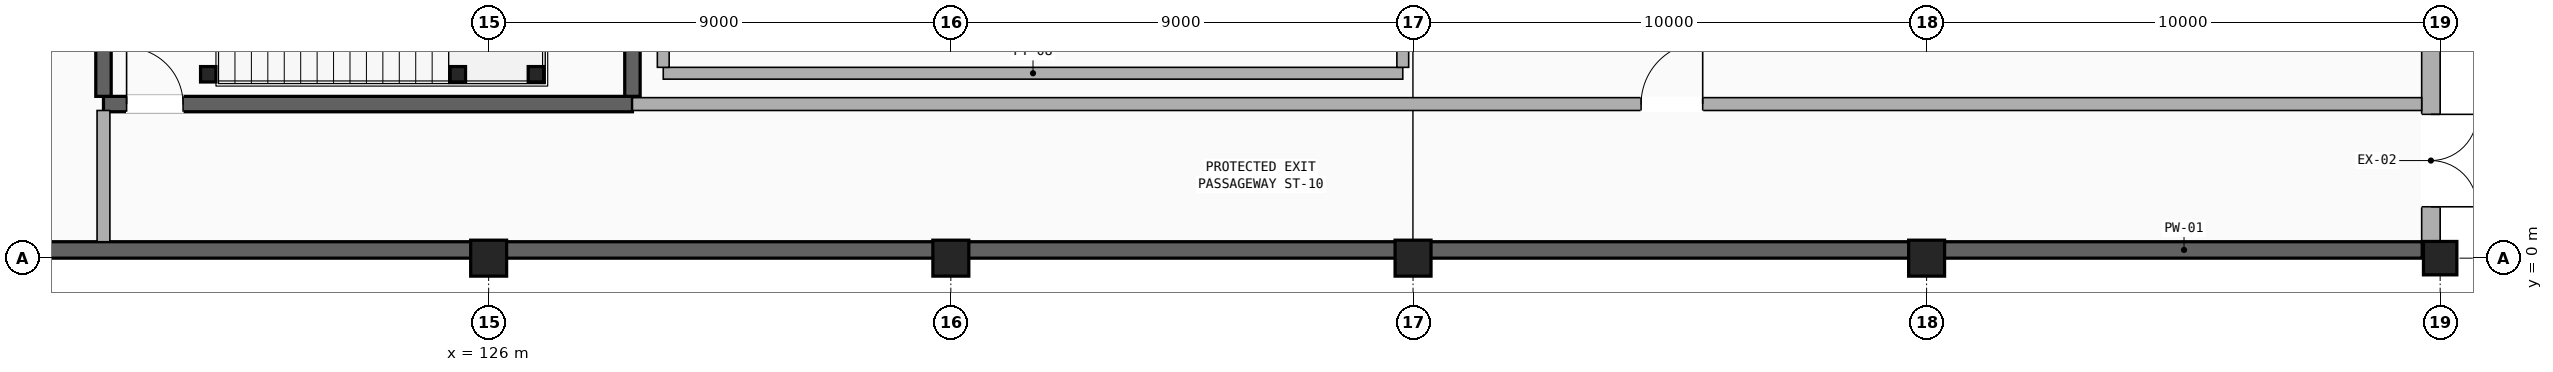
"""IFC4 building model, lengths in metres.
Left out: names, types, materials, properties, quantities, classifications, styles, units other than length and angle.
Written with IfcOpenShell. Run it as: python <this file> out.ifc"""

import sys

from ifc_helpers import new_model, si_unit, direction, frame, frame_2d, origin, origin_2d, place, context, subcontext, project, spatial, rectangle, hollow_rectangle, extrude, element, fill, save


model = new_model("IFC4")
c1 = context("Model", 3, precision=1e-05, world=origin(), true_north=direction((0.0, 1.0)))
c2 = subcontext(c1, "Body", "Model", "MODEL_VIEW")
j1 = project(units=[si_unit("LENGTHUNIT", "METRE"), si_unit("PLANEANGLEUNIT", "RADIAN")], contexts=[c1])
p1 = place(None, origin())
s1 = spatial("IfcSite", under=j1, at=p1, CompositionType="ELEMENT")
p2 = place(p1, origin())
s2 = spatial("IfcBuilding", under=s1, at=p2, CompositionType="ELEMENT")
p3 = place(p2, origin())
s3 = spatial("IfcBuildingStorey", under=s2, at=p3, CompositionType="ELEMENT", Elevation=0.0)
for number, where, z_axis, x_axis in (
    (1, (126.0, 0.0, 0.0), (0.0, 0.0, 1.0), (1.0, 0.0, 0.0)),
    (2, (135.0, 0.0, 0.0), (0.0, 0.0, 1.0), (1.0, 0.0, 0.0)),
    (3, (144.0, 0.0, 0.0), (0.0, 0.0, 1.0), (1.0, 0.0, 0.0)),
    (4, (154.0, 0.0, 0.0), (0.0, 0.0, 1.0), (1.0, 0.0, 0.0)),
):
    element("IfcColumn", number, at=place(p3, frame(where, z_axis=z_axis, x_axis=x_axis)), inside=s3, PredefinedType="COLUMN", context=c2, shape_type="SweptSolid", body=[
        extrude(rectangle(XDim=0.7, YDim=0.7, at=origin_2d()), origin(), (0.0, 0.0, 1.0), 5.1),
    ])
p4 = place(p3, frame((164.0, 0.0, 0.0), z_axis=(0.0, 0.0, 1.0), x_axis=(1.0, 0.0, 0.0)))
e5 = element("IfcColumn", 5, at=p4, inside=s3, PredefinedType="COLUMN", context=c2, shape_type="SweptSolid", body=[
    extrude(rectangle(XDim=0.65, YDim=0.65, at=origin_2d()), origin(), (0.0, 0.0, 1.0), 5.1),
])
p5 = place(p3, frame((118.5, 3.0, 0.0), z_axis=(0.0, 0.0, 1.0), x_axis=(1.0, 0.0, 0.0)))
e6 = element("IfcWall", 6, at=p5, inside=s3, PredefinedType="SHEAR", context=c2, shape_type="SweptSolid", body=[
    extrude(rectangle(XDim=10.3, YDim=0.3, at=frame_2d((5.15, 0.0))), origin(), (0.0, 0.0, 1.0), 5.1),
])
p6 = place(p5, frame((0.45, 0.0, 0.0)))
e7 = element("IfcOpeningElement", 7, at=p6, cuts=e6, PredefinedType="OPENING", context=c2, shape_type="SweptSolid", body=[
    extrude(rectangle(XDim=1.1, YDim=2.2, at=frame_2d((0.55, 1.1))), frame((0.0, 0.16, 0.0), z_axis=(0.0, -1.0, 0.0), x_axis=(1.0, 0.0, 0.0)), (0.0, 0.0, 1.0), 0.32),
])
for number, where, z_axis, x_axis in (
    (8, (118.5, 3.15, 0.0), (0.0, 0.0, 1.0), (0.0, 1.0, 0.0)),
    (9, (128.8, 3.15, 0.0), (0.0, 0.0, 1.0), (0.0, 1.0, 0.0)),
):
    element("IfcWall", number, at=place(p3, frame(where, z_axis=z_axis, x_axis=x_axis)), inside=s3, PredefinedType="SHEAR", context=c2, shape_type="SweptSolid", body=[
        extrude(rectangle(XDim=5.1, YDim=0.3, at=frame_2d((2.55, 0.0))), origin(), (0.0, 0.0, 1.0), 5.1),
    ])
p7 = place(p3, frame((73.775, 0.16, 0.0), z_axis=(0.0, 0.0, 1.0), x_axis=(1.0, 0.0, 0.0)))
e10 = element("IfcWall", 10, at=p7, inside=s3, PredefinedType="SHEAR", context=c2, shape_type="SweptSolid", body=[
    extrude(rectangle(XDim=89.875, YDim=0.32, at=frame_2d((44.938, 0.0))), origin(), (0.0, 0.0, 1.0), 5.1),
])
p8 = place(p3, frame((163.82, 0.325, 0.0), z_axis=(0.0, 0.0, 1.0), x_axis=(0.0, 1.0, 0.0)))
e11 = element("IfcWall", 11, at=p8, inside=s3, PredefinedType="STANDARD", context=c2, shape_type="SweptSolid", body=[
    extrude(rectangle(XDim=8.35, YDim=0.36, at=frame_2d((4.175, 0.0))), origin(), (0.0, 0.0, 1.0), 4.08),
])
p9 = place(p8, frame((0.675, 0.0, 0.0)))
e12 = element("IfcOpeningElement", 12, at=p9, cuts=e11, PredefinedType="OPENING", context=c2, shape_type="SweptSolid", body=[
    extrude(rectangle(XDim=1.8, YDim=2.3, at=frame_2d((0.9, 1.15))), frame((0.0, 0.19, 0.0), z_axis=(0.0, -1.0, 0.0), x_axis=(1.0, 0.0, 0.0)), (0.0, 0.0, 1.0), 0.38),
])
p10 = place(p8, frame((5.025, 0.0, 0.9)))
e13 = element("IfcOpeningElement", 13, at=p10, cuts=e11, PredefinedType="OPENING", context=c2, shape_type="SweptSolid", body=[
    extrude(rectangle(XDim=1.4, YDim=2.4, at=frame_2d((0.7, 1.2))), frame((0.0, 0.19, 0.0), z_axis=(0.0, -1.0, 0.0), x_axis=(1.0, 0.0, 0.0)), (0.0, 0.0, 1.0), 0.38),
])
for number, where, z_axis, x_axis in (
    (14, (120.54, 3.58, 0.0), (0.0, 0.0, 1.0), (1.0, 0.0, 0.0)),
    (15, (125.4, 3.58, 0.0), (0.0, 0.0, 1.0), (1.0, 0.0, 0.0)),
    (16, (126.92, 3.58, 0.0), (0.0, 0.0, 1.0), (1.0, 0.0, 0.0)),
):
    element("IfcColumn", number, at=place(p3, frame(where, z_axis=z_axis, x_axis=x_axis)), inside=s3, PredefinedType="COLUMN", context=c2, shape_type="SweptSolid", body=[
        extrude(hollow_rectangle(XDim=0.3, YDim=0.3, WallThickness=0.016, InnerFilletRadius=0.016, OuterFilletRadius=0.032, at=origin_2d()), origin(), (0.0, 0.0, 1.0), 5.1),
    ])
p11 = place(p3, frame((129.4, 3.6, 0.0), z_axis=(0.0, 0.0, 1.0), x_axis=(1.0, 0.0, 0.0)))
e17 = element("IfcWall", 17, at=p11, inside=s3, PredefinedType="PARTITIONING", context=c2, shape_type="SweptSolid", body=[
    extrude(rectangle(XDim=14.4, YDim=0.23, at=frame_2d((7.2, 0.0))), origin(), (0.0, 0.0, 1.0), 4.15),
])
p12 = place(p3, frame((129.4, 3.715, 0.0), z_axis=(0.0, 0.0, 1.0), x_axis=(0.0, 1.0, 0.0)))
e18 = element("IfcWall", 18, at=p12, inside=s3, PredefinedType="PARTITIONING", context=c2, shape_type="SweptSolid", body=[
    extrude(rectangle(XDim=2.97, YDim=0.23, at=frame_2d((1.485, 0.0))), origin(), (0.0, 0.0, 1.0), 4.85),
])
p13 = place(p3, frame((143.8, 3.715, 0.0), z_axis=(0.0, 0.0, 1.0), x_axis=(0.0, 1.0, 0.0)))
e19 = element("IfcWall", 19, at=p13, inside=s3, PredefinedType="PARTITIONING", context=c2, shape_type="SweptSolid", body=[
    extrude(rectangle(XDim=2.97, YDim=0.23, at=frame_2d((1.485, 0.0))), origin(), (0.0, 0.0, 1.0), 4.15),
])
p14 = place(p3, frame((163.64, 3.0, 0.0), z_axis=(0.0, 0.0, 1.0), x_axis=(-1.0, 0.0, 0.0)))
e20 = element("IfcWall", 20, at=p14, inside=s3, PredefinedType="PARTITIONING", context=c2, shape_type="SweptSolid", body=[
    extrude(rectangle(XDim=34.84, YDim=0.25, at=frame_2d((17.42, 0.0))), origin(), (0.0, 0.0, 1.0), 4.15),
])
p15 = place(p14, frame((14.0, 0.0, 0.0)))
e21 = element("IfcOpeningElement", 21, at=p15, cuts=e20, PredefinedType="OPENING", context=c2, shape_type="SweptSolid", body=[
    extrude(rectangle(XDim=1.2, YDim=2.2, at=frame_2d((0.6, 1.1))), frame((0.0, 0.135, 0.0), z_axis=(0.0, -1.0, 0.0), x_axis=(1.0, 0.0, 0.0)), (0.0, 0.0, 1.0), 0.27),
])
p16 = place(p3, frame((118.5, 2.875, 0.0), z_axis=(0.0, 0.0, 1.0), x_axis=(0.0, -1.0, 0.0)))
e22 = element("IfcWall", 22, at=p16, inside=s3, PredefinedType="PARTITIONING", context=c2, shape_type="SweptSolid", body=[
    extrude(rectangle(XDim=2.555, YDim=0.25, at=frame_2d((1.277, 0.0))), origin(), (0.0, 0.0, 1.0), 4.08),
])
p17 = place(p9, frame((1.8, 0.0, 0.0), z_axis=(0.0, 0.0, 1.0), x_axis=(-1.0, 0.0, 0.0)))
e23 = element("IfcDoor", 23, at=p17, inside=s3, OperationType="DOUBLE_DOOR_SINGLE_SWING", PredefinedType="DOOR", context=c2, shape_type="SweptSolid", body=[
    extrude(rectangle(XDim=1.8, YDim=2.3, at=frame_2d((0.9, 1.15))), frame((0.0, 0.025, 0.0), z_axis=(0.0, -1.0, 0.0), x_axis=(1.0, 0.0, 0.0)), (0.0, 0.0, 1.0), 0.05),
])
fill(e12, e23)
p18 = place(p6, origin())
e24 = element("IfcDoor", 24, at=p18, inside=s3, OperationType="SINGLE_SWING_LEFT", PredefinedType="DOOR", context=c2, shape_type="SweptSolid", body=[
    extrude(rectangle(XDim=1.1, YDim=2.2, at=frame_2d((0.55, 1.1))), frame((0.0, 0.025, 0.0), z_axis=(0.0, -1.0, 0.0), x_axis=(1.0, 0.0, 0.0)), (0.0, 0.0, 1.0), 0.05),
])
fill(e7, e24)
p19 = place(p15, frame((1.2, 0.0, 0.0), z_axis=(0.0, 0.0, 1.0), x_axis=(-1.0, 0.0, 0.0)))
e25 = element("IfcDoor", 25, at=p19, inside=s3, OperationType="SINGLE_SWING_RIGHT", PredefinedType="DOOR", context=c2, shape_type="SweptSolid", body=[
    extrude(rectangle(XDim=1.2, YDim=2.2, at=frame_2d((0.6, 1.1))), frame((0.0, 0.025, 0.0), z_axis=(0.0, -1.0, 0.0), x_axis=(1.0, 0.0, 0.0)), (0.0, 0.0, 1.0), 0.05),
])
fill(e21, e25)
save(model, sys.argv[1])
